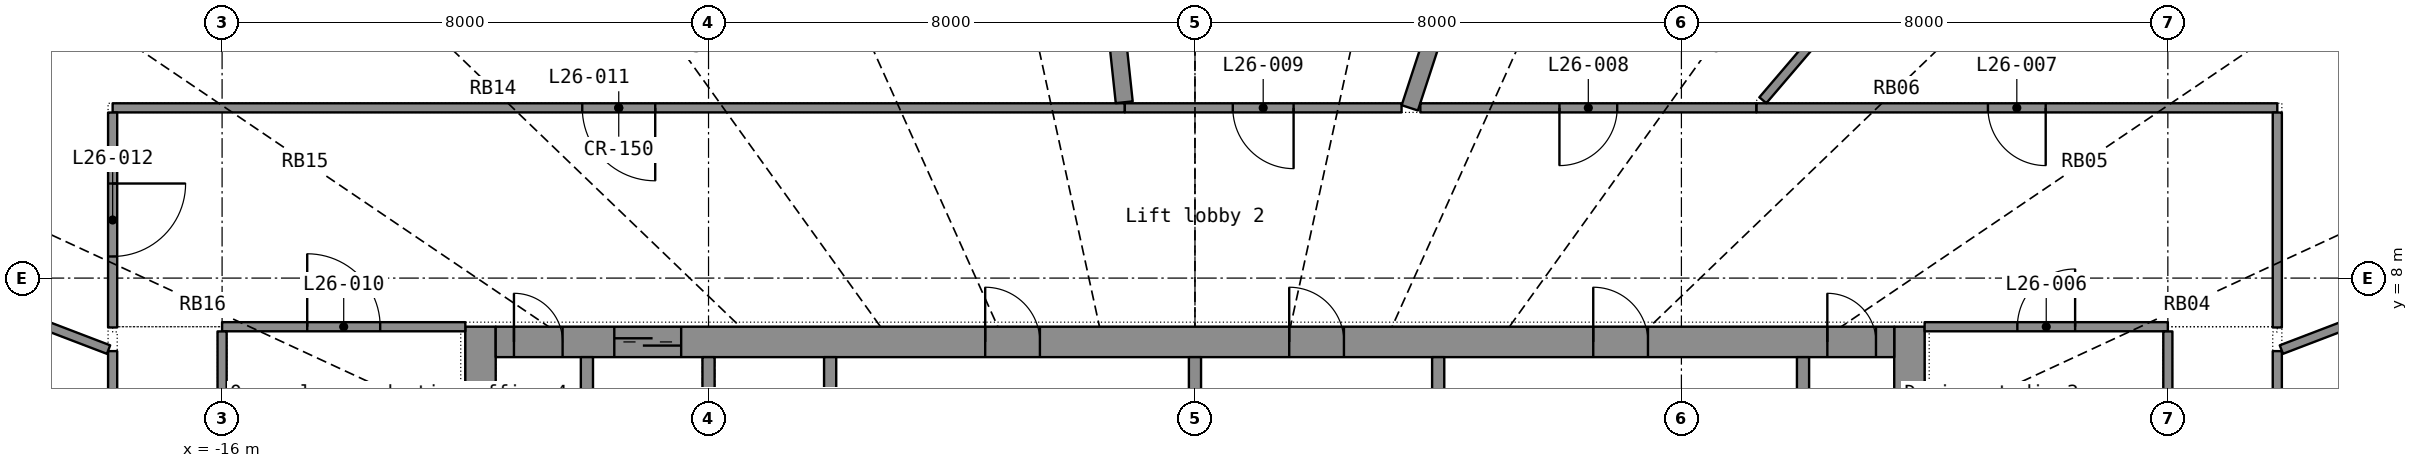
"""IFC4 building model, lengths in metres.
Left out: names, types, materials, properties, quantities, classifications, styles, units other than length and angle.
Written with IfcOpenShell. Run it as: python <this file> out.ifc"""

import sys

from ifc_helpers import new_model, si_unit, direction, frame, frame_2d, origin, place, context, subcontext, project, spatial, rectangle, extrude, element, fill, save


model = new_model("IFC4")
c1 = context("Model", 3, precision=1e-05, world=origin(), true_north=direction((0.0, 1.0)))
c2 = subcontext(c1, "Body", "Model", "MODEL_VIEW")
j1 = project(units=[si_unit("LENGTHUNIT", "METRE"), si_unit("PLANEANGLEUNIT", "RADIAN")], contexts=[c1])
p1 = place(None, origin())
s1 = spatial("IfcSite", under=j1, at=p1, CompositionType="ELEMENT")
p2 = place(p1, origin())
s2 = spatial("IfcBuilding", under=s1, at=p2, CompositionType="ELEMENT")
p3 = place(p2, frame((0.0, 0.0, 111.9)))
s3 = spatial("IfcBuildingStorey", under=s2, at=p3, CompositionType="ELEMENT", Elevation=111.9)
p4 = place(p3, frame((-11.75, -7.2, 0.0), z_axis=(0.0, 0.0, 1.0), x_axis=(0.0, 1.0, 0.0)))
e1 = element("IfcWall", 1, at=p4, inside=s3, PredefinedType="SHEAR", context=c2, shape_type="SweptSolid", body=[
    extrude(rectangle(XDim=14.4, YDim=0.5, at=frame_2d((7.2, 0.0))), origin(), (0.0, 0.0, 1.0), 3.3),
])
p5 = place(p4, frame((6.5, 0.0, 0.0)))
e2 = element("IfcOpeningElement", 2, at=p5, cuts=e1, PredefinedType="OPENING", context=c2, shape_type="SweptSolid", body=[
    extrude(rectangle(XDim=1.4, YDim=2.2, at=frame_2d((0.7, 1.1))), frame((0.0, 0.26, 0.0), z_axis=(0.0, -1.0, 0.0), x_axis=(1.0, 0.0, 0.0)), (0.0, 0.0, 1.0), 0.52),
])
p6 = place(p3, frame((11.75, -7.2, 0.0), z_axis=(0.0, 0.0, 1.0), x_axis=(0.0, 1.0, 0.0)))
e3 = element("IfcWall", 3, at=p6, inside=s3, PredefinedType="SHEAR", context=c2, shape_type="SweptSolid", body=[
    extrude(rectangle(XDim=14.4, YDim=0.5, at=frame_2d((7.2, 0.0))), origin(), (0.0, 0.0, 1.0), 3.3),
])
p7 = place(p6, frame((6.5, 0.0, 0.0)))
e4 = element("IfcOpeningElement", 4, at=p7, cuts=e3, PredefinedType="OPENING", context=c2, shape_type="SweptSolid", body=[
    extrude(rectangle(XDim=1.4, YDim=2.2, at=frame_2d((0.7, 1.1))), frame((0.0, 0.26, 0.0), z_axis=(0.0, -1.0, 0.0), x_axis=(1.0, 0.0, 0.0)), (0.0, 0.0, 1.0), 0.52),
])
p8 = place(p3, frame((-11.5, 6.95, 0.0), z_axis=(0.0, 0.0, 1.0), x_axis=(1.0, 0.0, 0.0)))
e5 = element("IfcWall", 5, at=p8, inside=s3, PredefinedType="SHEAR", context=c2, shape_type="SweptSolid", body=[
    extrude(rectangle(XDim=23.0, YDim=0.5, at=frame_2d((11.5, 0.0))), origin(), (0.0, 0.0, 1.0), 3.3),
])
p9 = place(p8, frame((1.95, 0.0, 0.0)))
e6 = element("IfcOpeningElement", 6, at=p9, cuts=e5, PredefinedType="OPENING", context=c2, shape_type="SweptSolid", body=[
    extrude(rectangle(XDim=1.1, YDim=2.2, at=frame_2d((0.55, 1.1))), frame((0.0, 0.26, 0.0), z_axis=(0.0, -1.0, 0.0), x_axis=(1.0, 0.0, 0.0)), (0.0, 0.0, 1.0), 0.52),
])
p10 = place(p8, frame((8.05, 0.0, 0.0)))
e7 = element("IfcOpeningElement", 7, at=p10, cuts=e5, PredefinedType="OPENING", context=c2, shape_type="SweptSolid", body=[
    extrude(rectangle(XDim=0.9, YDim=2.1, at=frame_2d((0.45, 1.05))), frame((0.0, 0.26, 0.0), z_axis=(0.0, -1.0, 0.0), x_axis=(1.0, 0.0, 0.0)), (0.0, 0.0, 1.0), 0.52),
])
p11 = place(p8, frame((13.05, 0.0, 0.0)))
e8 = element("IfcOpeningElement", 8, at=p11, cuts=e5, PredefinedType="OPENING", context=c2, shape_type="SweptSolid", body=[
    extrude(rectangle(XDim=0.9, YDim=2.1, at=frame_2d((0.45, 1.05))), frame((0.0, 0.26, 0.0), z_axis=(0.0, -1.0, 0.0), x_axis=(1.0, 0.0, 0.0)), (0.0, 0.0, 1.0), 0.52),
])
p12 = place(p8, frame((18.05, 0.0, 0.0)))
e9 = element("IfcOpeningElement", 9, at=p12, cuts=e5, PredefinedType="OPENING", context=c2, shape_type="SweptSolid", body=[
    extrude(rectangle(XDim=0.9, YDim=2.1, at=frame_2d((0.45, 1.05))), frame((0.0, 0.26, 0.0), z_axis=(0.0, -1.0, 0.0), x_axis=(1.0, 0.0, 0.0)), (0.0, 0.0, 1.0), 0.52),
])
p13 = place(p8, frame((0.3, 0.0, 0.0)))
e10 = element("IfcOpeningElement", 10, at=p13, cuts=e5, PredefinedType="OPENING", context=c2, shape_type="SweptSolid", body=[
    extrude(rectangle(XDim=0.8, YDim=2.05, at=frame_2d((0.4, 1.025))), frame((0.0, 0.26, 0.0), z_axis=(0.0, -1.0, 0.0), x_axis=(1.0, 0.0, 0.0)), (0.0, 0.0, 1.0), 0.52),
])
p14 = place(p8, frame((21.9, 0.0, 0.0)))
e11 = element("IfcOpeningElement", 11, at=p14, cuts=e5, PredefinedType="OPENING", context=c2, shape_type="SweptSolid", body=[
    extrude(rectangle(XDim=0.8, YDim=2.05, at=frame_2d((0.4, 1.025))), frame((0.0, 0.26, 0.0), z_axis=(0.0, -1.0, 0.0), x_axis=(1.0, 0.0, 0.0)), (0.0, 0.0, 1.0), 0.52),
])
for number, where, z_axis, x_axis in (
    (12, (-10.0, 3.9, 0.0), (0.0, 0.0, 1.0), (0.0, 1.0, 0.0)),
    (13, (-8.0, 3.9, 0.0), (0.0, 0.0, 1.0), (0.0, 1.0, 0.0)),
    (14, (-6.0, 3.9, 0.0), (0.0, 0.0, 1.0), (0.0, 1.0, 0.0)),
    (15, (10.0, 3.9, 0.0), (0.0, 0.0, 1.0), (0.0, 1.0, 0.0)),
):
    element("IfcWall", number, at=place(p3, frame(where, z_axis=z_axis, x_axis=x_axis)), inside=s3, PredefinedType="SHEAR", context=c2, shape_type="SweptSolid", body=[
        extrude(rectangle(XDim=2.8, YDim=0.2, at=frame_2d((1.4, 0.0))), origin(), (0.0, 0.0, 1.0), 3.3),
    ])
for number, where, z_axis, x_axis in (
    (16, (0.0, 3.9, 0.0), (0.0, 0.0, 1.0), (0.0, 1.0, 0.0)),
    (17, (4.0, 3.9, 0.0), (0.0, 0.0, 1.0), (0.0, 1.0, 0.0)),
):
    element("IfcWall", number, at=place(p3, frame(where, z_axis=z_axis, x_axis=x_axis)), inside=s3, PredefinedType="PARTITIONING", context=c2, shape_type="SweptSolid", body=[
        extrude(rectangle(XDim=2.8, YDim=0.2, at=frame_2d((1.4, 0.0))), origin(), (0.0, 0.0, 1.0), 3.3),
    ])
p15 = place(p3, frame((-1.154, 10.8, 0.0), z_axis=(0.0, 0.0, 1.0), x_axis=(-1.0, 0.0, 0.0)))
e18 = element("IfcWall", 18, at=p15, inside=s3, PredefinedType="PARTITIONING", context=c2, shape_type="SweptSolid", body=[
    extrude(rectangle(XDim=16.646, YDim=0.15, at=frame_2d((8.323, 0.0))), origin(), (0.0, 0.0, 1.0), 2.4),
])
p16 = place(p15, frame((7.723, 0.0, 0.0)))
e19 = element("IfcOpeningElement", 19, at=p16, cuts=e18, PredefinedType="OPENING", context=c2, shape_type="SweptSolid", body=[
    extrude(rectangle(XDim=1.2, YDim=2.2, at=frame_2d((0.6, 1.1))), frame((0.0, 0.085, 0.0), z_axis=(0.0, -1.0, 0.0), x_axis=(1.0, 0.0, 0.0)), (0.0, 0.0, 1.0), 0.17),
])
p17 = place(p3, frame((17.8, -6.799, 0.0), z_axis=(0.0, 0.0, 1.0), x_axis=(0.0, 1.0, 0.0)))
e20 = element("IfcWall", 20, at=p17, inside=s3, PredefinedType="PARTITIONING", context=c2, shape_type="SweptSolid", body=[
    extrude(rectangle(XDim=13.598, YDim=0.15, at=frame_2d((6.799, 0.0))), origin(), (0.0, 0.0, 1.0), 2.4),
])
p18 = place(p17, frame((6.199, 0.0, 0.0)))
e21 = element("IfcOpeningElement", 21, at=p18, cuts=e20, PredefinedType="OPENING", context=c2, shape_type="SweptSolid", body=[
    extrude(rectangle(XDim=1.2, YDim=2.2, at=frame_2d((0.6, 1.1))), frame((0.0, 0.085, 0.0), z_axis=(0.0, -1.0, 0.0), x_axis=(1.0, 0.0, 0.0)), (0.0, 0.0, 1.0), 0.17),
])
p19 = place(p3, frame((-17.8, 6.799, 0.0), z_axis=(0.0, 0.0, 1.0), x_axis=(0.0, -1.0, 0.0)))
e22 = element("IfcWall", 22, at=p19, inside=s3, PredefinedType="PARTITIONING", context=c2, shape_type="SweptSolid", body=[
    extrude(rectangle(XDim=10.706, YDim=0.15, at=frame_2d((5.353, 0.0))), origin(), (0.0, 0.0, 1.0), 2.4),
])
p20 = place(p19, frame((4.753, 0.0, 0.0)))
e23 = element("IfcOpeningElement", 23, at=p20, cuts=e22, PredefinedType="OPENING", context=c2, shape_type="SweptSolid", body=[
    extrude(rectangle(XDim=1.2, YDim=2.2, at=frame_2d((0.6, 1.1))), frame((0.0, 0.085, 0.0), z_axis=(0.0, -1.0, 0.0), x_axis=(1.0, 0.0, 0.0)), (0.0, 0.0, 1.0), 0.17),
])
p21 = place(p3, frame((-2.219, 20.775, 0.0), z_axis=(0.0, 0.0, 1.0), x_axis=(0.106213943, -0.9943433, 0.0)))
e24 = element("IfcWall", 24, at=p21, inside=s3, PredefinedType="PARTITIONING", context=c2, shape_type="SweptSolid", body=[
    extrude(rectangle(XDim=9.939, YDim=0.28, at=frame_2d((4.969, 0.0))), origin(), (0.0, 0.0, 1.0), 2.4),
])
p22 = place(p21, frame((4.219, 0.0, 1.0)))
e25 = element("IfcOpeningElement", 25, at=p22, cuts=e24, PredefinedType="OPENING", context=c2, shape_type="SweptSolid", body=[
    extrude(rectangle(XDim=1.5, YDim=1.2, at=frame_2d((0.75, 0.6))), frame((0.0, 0.15, 0.0), z_axis=(0.0, -1.0, 0.0), x_axis=(1.0, 0.0, 0.0)), (0.0, 0.0, 1.0), 0.3),
])
p23 = place(p3, frame((6.59, 20.144, 0.0), z_axis=(0.0, 0.0, 1.0), x_axis=(-0.310918337, -0.95043663, 0.0)))
e26 = element("IfcWall", 26, at=p23, inside=s3, PredefinedType="PARTITIONING", context=c2, shape_type="SweptSolid", body=[
    extrude(rectangle(XDim=9.831, YDim=0.28, at=frame_2d((4.916, 0.0))), origin(), (0.0, 0.0, 1.0), 2.4),
])
p24 = place(p3, frame((17.8, 10.8, 0.0), z_axis=(0.0, 0.0, 1.0), x_axis=(-1.0, 0.0, 0.0)))
e27 = element("IfcWall", 27, at=p24, inside=s3, PredefinedType="PARTITIONING", context=c2, shape_type="SweptSolid", body=[
    extrude(rectangle(XDim=8.568, YDim=0.15, at=frame_2d((4.284, 0.0))), origin(), (0.0, 0.0, 1.0), 2.4),
])
p25 = place(p24, frame((3.809, 0.0, 0.0)))
e28 = element("IfcOpeningElement", 28, at=p25, cuts=e27, PredefinedType="OPENING", context=c2, shape_type="SweptSolid", body=[
    extrude(rectangle(XDim=0.95, YDim=2.15, at=frame_2d((0.475, 1.075))), frame((0.0, 0.085, 0.0), z_axis=(0.0, -1.0, 0.0), x_axis=(1.0, 0.0, 0.0)), (0.0, 0.0, 1.0), 0.17),
])
p26 = place(p3, frame((14.607, 17.087, 0.0), z_axis=(0.0, 0.0, 1.0), x_axis=(-0.649776378, -0.760125423, 0.0)))
e29 = element("IfcWall", 29, at=p26, inside=s3, PredefinedType="PARTITIONING", context=c2, shape_type="SweptSolid", body=[
    extrude(rectangle(XDim=8.106, YDim=0.15, at=frame_2d((4.053, 0.0))), origin(), (0.0, 0.0, 1.0), 2.4),
])
p27 = place(p3, frame((9.231, 10.8, 0.0), z_axis=(0.0, 0.0, 1.0), x_axis=(-1.0, 0.0, 0.0)))
e30 = element("IfcWall", 30, at=p27, inside=s3, PredefinedType="PARTITIONING", context=c2, shape_type="SweptSolid", body=[
    extrude(rectangle(XDim=5.524, YDim=0.15, at=frame_2d((2.762, 0.0))), origin(), (0.0, 0.0, 1.0), 2.4),
])
p28 = place(p27, frame((2.287, 0.0, 0.0)))
e31 = element("IfcOpeningElement", 31, at=p28, cuts=e30, PredefinedType="OPENING", context=c2, shape_type="SweptSolid", body=[
    extrude(rectangle(XDim=0.95, YDim=2.15, at=frame_2d((0.475, 1.075))), frame((0.0, 0.085, 0.0), z_axis=(0.0, -1.0, 0.0), x_axis=(1.0, 0.0, 0.0)), (0.0, 0.0, 1.0), 0.17),
])
p29 = place(p3, frame((-23.094, 8.821, 0.0), z_axis=(0.0, 0.0, 1.0), x_axis=(0.934174226, -0.356817201, 0.0)))
e32 = element("IfcWall", 32, at=p29, inside=s3, PredefinedType="PARTITIONING", context=c2, shape_type="SweptSolid", body=[
    extrude(rectangle(XDim=5.595, YDim=0.15, at=frame_2d((2.797, 0.0))), origin(), (0.0, 0.0, 1.0), 2.4),
])
p30 = place(p3, frame((23.092, 8.82, 0.0), z_axis=(0.0, 0.0, 1.0), x_axis=(-0.934164423, -0.356842865, 0.0)))
e33 = element("IfcWall", 33, at=p30, inside=s3, PredefinedType="PARTITIONING", context=c2, shape_type="SweptSolid", body=[
    extrude(rectangle(XDim=5.593, YDim=0.15, at=frame_2d((2.796, 0.0))), origin(), (0.0, 0.0, 1.0), 2.4),
])
p31 = place(p3, frame((3.398, 10.8, 0.0), z_axis=(0.0, 0.0, 1.0), x_axis=(-1.0, 0.0, 0.0)))
e34 = element("IfcWall", 34, at=p31, inside=s3, PredefinedType="PARTITIONING", context=c2, shape_type="SweptSolid", body=[
    extrude(rectangle(XDim=4.551, YDim=0.15, at=frame_2d((2.276, 0.0))), origin(), (0.0, 0.0, 1.0), 2.4),
])
p32 = place(p31, frame((1.776, 0.0, 0.0)))
e35 = element("IfcOpeningElement", 35, at=p32, cuts=e34, PredefinedType="OPENING", context=c2, shape_type="SweptSolid", body=[
    extrude(rectangle(XDim=1.0, YDim=2.2, at=frame_2d((0.5, 1.1))), frame((0.0, 0.085, 0.0), z_axis=(0.0, -1.0, 0.0), x_axis=(1.0, 0.0, 0.0)), (0.0, 0.0, 1.0), 0.17),
])
p33 = place(p3, frame((-16.0, 7.2, 0.0), z_axis=(0.0, 0.0, 1.0), x_axis=(1.0, 0.0, 0.0)))
e36 = element("IfcWall", 36, at=p33, inside=s3, PredefinedType="PARTITIONING", context=c2, shape_type="SweptSolid", body=[
    extrude(rectangle(XDim=4.0, YDim=0.15, at=frame_2d((2.0, 0.0))), origin(), (0.0, 0.0, 1.0), 2.4),
])
p34 = place(p33, frame((1.4, 0.0, 0.0)))
e37 = element("IfcOpeningElement", 37, at=p34, cuts=e36, PredefinedType="OPENING", context=c2, shape_type="SweptSolid", body=[
    extrude(rectangle(XDim=1.2, YDim=2.2, at=frame_2d((0.6, 1.1))), frame((0.0, 0.085, 0.0), z_axis=(0.0, -1.0, 0.0), x_axis=(1.0, 0.0, 0.0)), (0.0, 0.0, 1.0), 0.17),
])
p35 = place(p3, frame((12.0, 7.2, 0.0), z_axis=(0.0, 0.0, 1.0), x_axis=(1.0, 0.0, 0.0)))
e38 = element("IfcWall", 38, at=p35, inside=s3, PredefinedType="PARTITIONING", context=c2, shape_type="SweptSolid", body=[
    extrude(rectangle(XDim=4.0, YDim=0.15, at=frame_2d((2.0, 0.0))), origin(), (0.0, 0.0, 1.0), 2.4),
])
p36 = place(p35, frame((1.525, 0.0, 0.0)))
e39 = element("IfcOpeningElement", 39, at=p36, cuts=e38, PredefinedType="OPENING", context=c2, shape_type="SweptSolid", body=[
    extrude(rectangle(XDim=0.95, YDim=2.15, at=frame_2d((0.475, 1.075))), frame((0.0, 0.085, 0.0), z_axis=(0.0, -1.0, 0.0), x_axis=(1.0, 0.0, 0.0)), (0.0, 0.0, 1.0), 0.17),
])
p37 = place(p3, frame((-17.8, 10.723, 0.0), z_axis=(0.0, 0.0, 1.0), x_axis=(0.0, -1.0, 0.0)))
e40 = element("IfcWall", 40, at=p37, inside=s3, PredefinedType="PARTITIONING", context=c2, shape_type="SweptSolid", body=[
    extrude(rectangle(XDim=3.535, YDim=0.15, at=frame_2d((1.768, 0.0))), origin(), (0.0, 0.0, 1.0), 2.4),
])
p38 = place(p37, frame((1.167, 0.0, 0.0)))
e41 = element("IfcOpeningElement", 41, at=p38, cuts=e40, PredefinedType="OPENING", context=c2, shape_type="SweptSolid", body=[
    extrude(rectangle(XDim=1.2, YDim=2.2, at=frame_2d((0.6, 1.1))), frame((0.0, 0.085, 0.0), z_axis=(0.0, -1.0, 0.0), x_axis=(1.0, 0.0, 0.0)), (0.0, 0.0, 1.0), 0.17),
])
p39 = place(p3, frame((17.8, 7.188, 0.0), z_axis=(0.0, 0.0, 1.0), x_axis=(0.0, 1.0, 0.0)))
e42 = element("IfcWall", 42, at=p39, inside=s3, PredefinedType="PARTITIONING", context=c2, shape_type="SweptSolid", body=[
    extrude(rectangle(XDim=3.535, YDim=0.15, at=frame_2d((1.768, 0.0))), origin(), (0.0, 0.0, 1.0), 2.4),
])
for number, where, z_axis, x_axis in (
    (43, (-16.0, 6.112, 0.0), (0.0, 0.0, 1.0), (0.0, 1.0, 0.0)),
    (44, (16.0, 7.123, 0.0), (0.0, 0.0, 1.0), (0.0, -1.0, 0.0)),
):
    element("IfcWall", number, at=place(p3, frame(where, z_axis=z_axis, x_axis=x_axis)), inside=s3, PredefinedType="PARTITIONING", context=c2, shape_type="SweptSolid", body=[
        extrude(rectangle(XDim=1.011, YDim=0.15, at=frame_2d((0.505, 0.0))), origin(), (0.0, 0.0, 1.0), 2.4),
    ])
p40 = place(p9, origin())
e45 = element("IfcDoor", 45, at=p40, inside=s3, OperationType="DOUBLE_DOOR_SLIDING", PredefinedType="DOOR", context=c2, shape_type="SweptSolid", body=[
    extrude(rectangle(XDim=1.1, YDim=2.2, at=frame_2d((0.55, 1.1))), frame((0.0, 0.025, 0.0), z_axis=(0.0, -1.0, 0.0), x_axis=(1.0, 0.0, 0.0)), (0.0, 0.0, 1.0), 0.05),
])
fill(e6, e45)
p41 = place(p10, origin())
e46 = element("IfcDoor", 46, at=p41, inside=s3, OperationType="SINGLE_SWING_LEFT", PredefinedType="DOOR", context=c2, shape_type="SweptSolid", body=[
    extrude(rectangle(XDim=0.9, YDim=2.1, at=frame_2d((0.45, 1.05))), frame((0.0, 0.025, 0.0), z_axis=(0.0, -1.0, 0.0), x_axis=(1.0, 0.0, 0.0)), (0.0, 0.0, 1.0), 0.05),
])
fill(e7, e46)
p42 = place(p11, origin())
e47 = element("IfcDoor", 47, at=p42, inside=s3, OperationType="SINGLE_SWING_LEFT", PredefinedType="DOOR", context=c2, shape_type="SweptSolid", body=[
    extrude(rectangle(XDim=0.9, YDim=2.1, at=frame_2d((0.45, 1.05))), frame((0.0, 0.025, 0.0), z_axis=(0.0, -1.0, 0.0), x_axis=(1.0, 0.0, 0.0)), (0.0, 0.0, 1.0), 0.05),
])
fill(e8, e47)
p43 = place(p12, origin())
e48 = element("IfcDoor", 48, at=p43, inside=s3, OperationType="SINGLE_SWING_LEFT", PredefinedType="DOOR", context=c2, shape_type="SweptSolid", body=[
    extrude(rectangle(XDim=0.9, YDim=2.1, at=frame_2d((0.45, 1.05))), frame((0.0, 0.025, 0.0), z_axis=(0.0, -1.0, 0.0), x_axis=(1.0, 0.0, 0.0)), (0.0, 0.0, 1.0), 0.05),
])
fill(e9, e48)
p44 = place(p13, origin())
e49 = element("IfcDoor", 49, at=p44, inside=s3, OperationType="SINGLE_SWING_LEFT", PredefinedType="DOOR", context=c2, shape_type="SweptSolid", body=[
    extrude(rectangle(XDim=0.8, YDim=2.05, at=frame_2d((0.4, 1.025))), frame((0.0, 0.025, 0.0), z_axis=(0.0, -1.0, 0.0), x_axis=(1.0, 0.0, 0.0)), (0.0, 0.0, 1.0), 0.05),
])
fill(e10, e49)
p45 = place(p14, origin())
e50 = element("IfcDoor", 50, at=p45, inside=s3, OperationType="SINGLE_SWING_LEFT", PredefinedType="DOOR", context=c2, shape_type="SweptSolid", body=[
    extrude(rectangle(XDim=0.8, YDim=2.05, at=frame_2d((0.4, 1.025))), frame((0.0, 0.025, 0.0), z_axis=(0.0, -1.0, 0.0), x_axis=(1.0, 0.0, 0.0)), (0.0, 0.0, 1.0), 0.05),
])
fill(e11, e50)
p46 = place(p36, origin())
e51 = element("IfcDoor", 51, at=p46, inside=s3, OperationType="SINGLE_SWING_RIGHT", PredefinedType="DOOR", context=c2, shape_type="SweptSolid", body=[
    extrude(rectangle(XDim=0.95, YDim=2.15, at=frame_2d((0.475, 1.075))), frame((0.0, 0.025, 0.0), z_axis=(0.0, -1.0, 0.0), x_axis=(1.0, 0.0, 0.0)), (0.0, 0.0, 1.0), 0.05),
])
fill(e39, e51)
p47 = place(p25, origin())
e52 = element("IfcDoor", 52, at=p47, inside=s3, OperationType="SINGLE_SWING_LEFT", PredefinedType="DOOR", context=c2, shape_type="SweptSolid", body=[
    extrude(rectangle(XDim=0.95, YDim=2.15, at=frame_2d((0.475, 1.075))), frame((0.0, 0.025, 0.0), z_axis=(0.0, -1.0, 0.0), x_axis=(1.0, 0.0, 0.0)), (0.0, 0.0, 1.0), 0.05),
])
fill(e28, e52)
p48 = place(p28, origin())
e53 = element("IfcDoor", 53, at=p48, inside=s3, OperationType="SINGLE_SWING_RIGHT", PredefinedType="DOOR", context=c2, shape_type="SweptSolid", body=[
    extrude(rectangle(XDim=0.95, YDim=2.15, at=frame_2d((0.475, 1.075))), frame((0.0, 0.025, 0.0), z_axis=(0.0, -1.0, 0.0), x_axis=(1.0, 0.0, 0.0)), (0.0, 0.0, 1.0), 0.05),
])
fill(e31, e53)
p49 = place(p32, origin())
e54 = element("IfcDoor", 54, at=p49, inside=s3, OperationType="SINGLE_SWING_LEFT", PredefinedType="DOOR", context=c2, shape_type="SweptSolid", body=[
    extrude(rectangle(XDim=1.0, YDim=2.2, at=frame_2d((0.5, 1.1))), frame((0.0, 0.025, 0.0), z_axis=(0.0, -1.0, 0.0), x_axis=(1.0, 0.0, 0.0)), (0.0, 0.0, 1.0), 0.05),
])
fill(e35, e54)
p50 = place(p34, origin())
e55 = element("IfcDoor", 55, at=p50, inside=s3, OperationType="DOUBLE_DOOR_SINGLE_SWING", PredefinedType="DOOR", context=c2, shape_type="SweptSolid", body=[
    extrude(rectangle(XDim=1.2, YDim=2.2, at=frame_2d((0.6, 1.1))), frame((0.0, 0.025, 0.0), z_axis=(0.0, -1.0, 0.0), x_axis=(1.0, 0.0, 0.0)), (0.0, 0.0, 1.0), 0.05),
])
fill(e37, e55)
p51 = place(p16, origin())
e56 = element("IfcDoor", 56, at=p51, inside=s3, OperationType="DOUBLE_DOOR_SINGLE_SWING", PredefinedType="DOOR", context=c2, shape_type="SweptSolid", body=[
    extrude(rectangle(XDim=1.2, YDim=2.2, at=frame_2d((0.6, 1.1))), frame((0.0, 0.025, 0.0), z_axis=(0.0, -1.0, 0.0), x_axis=(1.0, 0.0, 0.0)), (0.0, 0.0, 1.0), 0.05),
])
fill(e19, e56)
p52 = place(p38, origin())
e57 = element("IfcDoor", 57, at=p52, inside=s3, OperationType="DOUBLE_DOOR_SINGLE_SWING", PredefinedType="DOOR", context=c2, shape_type="SweptSolid", body=[
    extrude(rectangle(XDim=1.2, YDim=2.2, at=frame_2d((0.6, 1.1))), frame((0.0, 0.025, 0.0), z_axis=(0.0, -1.0, 0.0), x_axis=(1.0, 0.0, 0.0)), (0.0, 0.0, 1.0), 0.05),
])
fill(e41, e57)
save(model, sys.argv[1])
